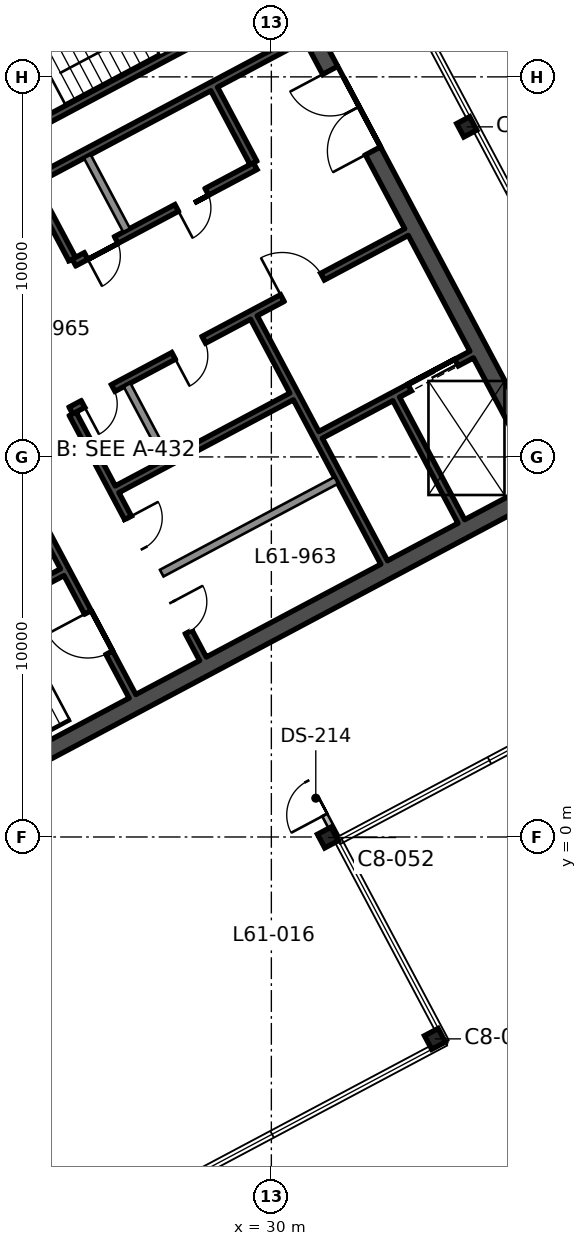
"""IFC4 building model, lengths in metres.
Left out: names, types, materials, properties, quantities, classifications, styles, units other than length and angle.
Written with IfcOpenShell. Run it as: python <this file> out.ifc"""

import sys

from ifc_helpers import new_model, si_unit, direction, frame, frame_2d, origin, origin_2d, place, context, subcontext, project, spatial, rectangle, i_section, extrude, element, fill, save


model = new_model("IFC4")
c1 = context("Model", 3, precision=1e-05, world=origin(), true_north=direction((0.0, 1.0)))
c2 = subcontext(c1, "Body", "Model", "MODEL_VIEW")
j1 = project(units=[si_unit("LENGTHUNIT", "METRE"), si_unit("PLANEANGLEUNIT", "RADIAN")], contexts=[c1])
p1 = place(None, origin())
s1 = spatial("IfcSite", under=j1, at=p1, CompositionType="ELEMENT")
p2 = place(p1, origin())
s2 = spatial("IfcBuilding", under=s1, at=p2, CompositionType="ELEMENT")
p3 = place(p2, frame((0.0, 0.0, 273.6)))
s3 = spatial("IfcBuildingStorey", under=s2, at=p3, CompositionType="ELEMENT", Elevation=273.6)
for number, where, z_axis, x_axis in (
    (1, (34.304, -5.312, 0.0), (0.0, 0.0, 1.0), (-0.469, 0.883, 0.0)),
    (2, (31.487, -0.014, 0.0), (0.0, 0.0, 1.0), (0.883, 0.469, 0.0)),
):
    element("IfcColumn", number, at=place(p3, frame(where, z_axis=z_axis, x_axis=x_axis)), inside=s3, PredefinedType="COLUMN", context=c2, shape_type="SweptSolid", body=[
        extrude(i_section(OverallWidth=0.404, OverallDepth=0.406, WebThickness=0.027, FlangeThickness=0.044, FilletRadius=0.015, at=origin_2d()), origin(), (0.0, 0.0, 1.0), 3.9),
    ])
p4 = place(p3, frame((35.141, 18.685, 0.0), z_axis=(0.0, 0.0, 1.0), x_axis=(-0.469471562786, 0.882947592859, 0.0)))
e3 = element("IfcColumn", 3, at=p4, inside=s3, PredefinedType="COLUMN", context=c2, shape_type="SweptSolid", body=[
    extrude(i_section(OverallWidth=0.399, OverallDepth=0.386, WebThickness=0.021, FlangeThickness=0.033, FilletRadius=0.015, at=origin_2d()), origin(), (0.0, 0.0, 1.0), 3.9),
])
p5 = place(p3, frame((37.439, 9.091, 0.0), z_axis=(0.0, 0.0, 1.0), x_axis=(-0.469467968382, 0.882949504028, 0.0)))
e4 = element("IfcWall", 4, at=p5, inside=s3, PredefinedType="SHEAR", context=c2, shape_type="SweptSolid", body=[
    extrude(rectangle(XDim=19.1, YDim=0.45, at=frame_2d((9.55, 0.0))), origin(), (0.0, 0.0, 1.0), 3.9),
])
p6 = place(p5, frame((10.15, 0.0, 0.0)))
e5 = element("IfcOpeningElement", 5, at=p6, cuts=e4, PredefinedType="OPENING", context=c2, shape_type="SweptSolid", body=[
    extrude(rectangle(XDim=2.4, YDim=2.4, at=frame_2d((1.2, 1.2))), frame((0.0, 0.235, 0.0), z_axis=(0.0, -1.0, 0.0), x_axis=(1.0, 0.0, 0.0)), (0.0, 0.0, 1.0), 0.47),
])
p7 = place(p3, frame((19.3, -0.299, 0.0), z_axis=(0.0, 0.0, 1.0), x_axis=(0.88295276571, 0.46946183394, 0.0)))
e6 = element("IfcWall", 6, at=p7, inside=s3, PredefinedType="SHEAR", context=c2, shape_type="SweptSolid", body=[
    extrude(rectangle(XDim=20.2, YDim=0.45, at=frame_2d((10.1, 0.0))), origin(), (0.0, 0.0, 1.0), 3.9),
])
p8 = place(p3, frame((10.544, 16.167, 0.0), z_axis=(0.0, 0.0, 1.0), x_axis=(0.882947755831, 0.46947125628, 0.0)))
e7 = element("IfcWall", 7, at=p8, inside=s3, PredefinedType="SHEAR", context=c2, shape_type="SweptSolid", body=[
    extrude(rectangle(XDim=20.2, YDim=0.45, at=frame_2d((10.1, 0.0))), origin(), (0.0, 0.0, 1.0), 3.9),
])
p9 = place(p3, frame((26.346, 3.702, 0.0), z_axis=(0.0, 0.0, 1.0), x_axis=(-0.469480409012, 0.88294288918, 0.0)))
e8 = element("IfcWall", 8, at=p9, inside=s3, PredefinedType="SHEAR", context=c2, shape_type="SweptSolid", body=[
    extrude(rectangle(XDim=7.3, YDim=0.2, at=frame_2d((3.65, 0.0))), origin(), (0.0, 0.0, 1.0), 3.9),
])
p10 = place(p9, frame((1.3, 0.0, 0.0)))
e9 = element("IfcOpeningElement", 9, at=p10, cuts=e8, PredefinedType="OPENING", context=c2, shape_type="SweptSolid", body=[
    extrude(rectangle(XDim=1.2, YDim=2.1, at=frame_2d((0.6, 1.05))), frame((0.0, 0.11, 0.0), z_axis=(0.0, -1.0, 0.0), x_axis=(1.0, 0.0, 0.0)), (0.0, 0.0, 1.0), 0.22),
])
p11 = place(p3, frame((28.2, 4.688, 0.0), z_axis=(0.0, 0.0, 1.0), x_axis=(-0.469454336211, 0.882956752176, 0.0)))
e10 = element("IfcWall", 10, at=p11, inside=s3, PredefinedType="SHEAR", context=c2, shape_type="SweptSolid", body=[
    extrude(rectangle(XDim=7.3, YDim=0.2, at=frame_2d((3.65, 0.0))), origin(), (0.0, 0.0, 1.0), 3.9),
])
p12 = place(p11, frame((0.8, 0.0, 0.0)))
e11 = element("IfcOpeningElement", 11, at=p12, cuts=e10, PredefinedType="OPENING", context=c2, shape_type="SweptSolid", body=[
    extrude(rectangle(XDim=0.9, YDim=2.1, at=frame_2d((0.45, 1.05))), frame((0.0, 0.11, 0.0), z_axis=(0.0, -1.0, 0.0), x_axis=(1.0, 0.0, 0.0)), (0.0, 0.0, 1.0), 0.22),
])
p13 = place(p11, frame((3.3, 0.0, 0.0)))
e12 = element("IfcOpeningElement", 12, at=p13, cuts=e10, PredefinedType="OPENING", context=c2, shape_type="SweptSolid", body=[
    extrude(rectangle(XDim=0.9, YDim=2.1, at=frame_2d((0.45, 1.05))), frame((0.0, 0.11, 0.0), z_axis=(0.0, -1.0, 0.0), x_axis=(1.0, 0.0, 0.0)), (0.0, 0.0, 1.0), 0.22),
])
p14 = place(p3, frame((27.236, 9.951, 0.0), z_axis=(0.0, 0.0, 1.0), x_axis=(-0.4694473164, 0.882960484464, 0.0)))
e13 = element("IfcWall", 13, at=p14, inside=s3, PredefinedType="SOLIDWALL", context=c2, shape_type="SweptSolid", body=[
    extrude(rectangle(XDim=2.2, YDim=0.2, at=frame_2d((1.1, 0.0))), origin(), (0.0, 0.0, 1.0), 3.9),
])
p15 = place(p3, frame((24.76, 15.204, 0.0), z_axis=(0.0, 0.0, 1.0), x_axis=(-0.469494272526, 0.882935517501, 0.0)))
e14 = element("IfcWall", 14, at=p15, inside=s3, PredefinedType="SHEAR", context=c2, shape_type="SweptSolid", body=[
    extrude(rectangle(XDim=7.3, YDim=0.2, at=frame_2d((3.65, 0.0))), origin(), (0.0, 0.0, 1.0), 3.9),
])
p16 = place(p15, frame((4.8, 0.0, 0.0)))
e15 = element("IfcOpeningElement", 15, at=p16, cuts=e14, PredefinedType="OPENING", context=c2, shape_type="SweptSolid", body=[
    extrude(rectangle(XDim=1.2, YDim=2.1, at=frame_2d((0.6, 1.05))), frame((0.0, 0.11, 0.0), z_axis=(0.0, -1.0, 0.0), x_axis=(1.0, 0.0, 0.0)), (0.0, 0.0, 1.0), 0.22),
])
p17 = place(p3, frame((26.191, 15.965, 0.0), z_axis=(0.0, 0.0, 1.0), x_axis=(-0.469533832133, 0.882914480843, 0.0)))
e16 = element("IfcWall", 16, at=p17, inside=s3, PredefinedType="SOLIDWALL", context=c2, shape_type="SweptSolid", body=[
    extrude(rectangle(XDim=2.2, YDim=0.2, at=frame_2d((1.1, 0.0))), origin(), (0.0, 0.0, 1.0), 3.9),
])
p18 = place(p3, frame((32.968, 7.223, 0.0), z_axis=(0.0, 0.0, 1.0), x_axis=(-0.469480409012, 0.88294288918, 0.0)))
e17 = element("IfcWall", 17, at=p18, inside=s3, PredefinedType="SHEAR", context=c2, shape_type="SweptSolid", body=[
    extrude(rectangle(XDim=7.3, YDim=0.2, at=frame_2d((3.65, 0.0))), origin(), (0.0, 0.0, 1.0), 3.9),
])
p19 = place(p3, frame((29.528, 17.739, 0.0), z_axis=(0.0, 0.0, 1.0), x_axis=(-0.469401318492, 0.882984938828, 0.0)))
e18 = element("IfcWall", 18, at=p19, inside=s3, PredefinedType="SHEAR", context=c2, shape_type="SweptSolid", body=[
    extrude(rectangle(XDim=2.2, YDim=0.2, at=frame_2d((1.1, 0.0))), origin(), (0.0, 0.0, 1.0), 3.9),
])
p20 = place(p3, frame((34.999, 8.303, 0.0), z_axis=(0.0, 0.0, 1.0), x_axis=(-0.4694665462, 0.882950260207, 0.0)))
e19 = element("IfcWall", 19, at=p20, inside=s3, PredefinedType="SHEAR", context=c2, shape_type="SweptSolid", body=[
    extrude(rectangle(XDim=3.65, YDim=0.2, at=frame_2d((1.825, 0.0))), origin(), (0.0, 0.0, 1.0), 3.9),
])
p21 = place(p3, frame((27.115, 6.942, 0.0), z_axis=(0.0, 0.0, 1.0), x_axis=(0.882934506056, 0.469496174655, 0.0)))
e20 = element("IfcWall", 20, at=p21, inside=s3, PredefinedType="SOLIDWALL", context=c2, shape_type="SweptSolid", body=[
    extrude(rectangle(XDim=5.2, YDim=0.2, at=frame_2d((2.6, 0.0))), origin(), (0.0, 0.0, 1.0), 3.9),
])
p22 = place(p3, frame((17.434, 3.21, 0.0), z_axis=(0.0, 0.0, 1.0), x_axis=(0.882940221191, 0.469485426614, 0.0)))
e21 = element("IfcWall", 21, at=p22, inside=s3, PredefinedType="SHEAR", context=c2, shape_type="SweptSolid", body=[
    extrude(rectangle(XDim=8.0, YDim=0.2, at=frame_2d((4.0, 0.0))), origin(), (0.0, 0.0, 1.0), 3.9),
])
p23 = place(p3, frame((31.296, 10.581, 0.0), z_axis=(0.0, 0.0, 1.0), x_axis=(0.882960433586, 0.469447412093, 0.0)))
e22 = element("IfcWall", 22, at=p23, inside=s3, PredefinedType="SHEAR", context=c2, shape_type="SweptSolid", body=[
    extrude(rectangle(XDim=4.5, YDim=0.2, at=frame_2d((2.25, 0.0))), origin(), (0.0, 0.0, 1.0), 3.9),
])
p24 = place(p23, frame((2.65, 0.0, 0.0)))
e23 = element("IfcOpeningElement", 23, at=p24, cuts=e22, PredefinedType="OPENING", context=c2, shape_type="SweptSolid", body=[
    extrude(rectangle(XDim=1.4, YDim=2.4, at=frame_2d((0.7, 1.2))), frame((0.0, 0.11, 0.0), z_axis=(0.0, -1.0, 0.0), x_axis=(1.0, 0.0, 0.0)), (0.0, 0.0, 1.0), 0.22),
])
p25 = place(p3, frame((25.941, 9.15, 0.0), z_axis=(0.0, 0.0, 1.0), x_axis=(0.882953967957, 0.469459572775, 0.0)))
e24 = element("IfcWall", 24, at=p25, inside=s3, PredefinedType="SHEAR", context=c2, shape_type="SweptSolid", body=[
    extrude(rectangle(XDim=5.2, YDim=0.2, at=frame_2d((2.6, 0.0))), origin(), (0.0, 0.0, 1.0), 3.9),
])
p26 = place(p3, frame((24.726, 11.222, 0.0), z_axis=(0.0, 0.0, 1.0), x_axis=(0.882940221191, 0.469485426614, 0.0)))
e25 = element("IfcWall", 25, at=p26, inside=s3, PredefinedType="SHEAR", context=c2, shape_type="SweptSolid", body=[
    extrude(rectangle(XDim=10.0, YDim=0.2, at=frame_2d((5.0, 0.0))), origin(), (0.0, 0.0, 1.0), 3.9),
])
p27 = place(p26, frame((6.3, 0.0, 0.0)))
e26 = element("IfcOpeningElement", 26, at=p27, cuts=e25, PredefinedType="OPENING", context=c2, shape_type="SweptSolid", body=[
    extrude(rectangle(XDim=1.2, YDim=2.1, at=frame_2d((0.6, 1.05))), frame((0.0, 0.11, 0.0), z_axis=(0.0, -1.0, 0.0), x_axis=(1.0, 0.0, 0.0)), (0.0, 0.0, 1.0), 0.22),
])
p28 = place(p26, frame((0.36, 0.0, 0.0)))
e27 = element("IfcOpeningElement", 27, at=p28, cuts=e25, PredefinedType="OPENING", context=c2, shape_type="SweptSolid", body=[
    extrude(rectangle(XDim=0.9, YDim=2.1, at=frame_2d((0.45, 1.05))), frame((0.0, 0.11, 0.0), z_axis=(0.0, -1.0, 0.0), x_axis=(1.0, 0.0, 0.0)), (0.0, 0.0, 1.0), 0.22),
])
p29 = place(p26, frame((3.06, 0.0, 0.0)))
e28 = element("IfcOpeningElement", 28, at=p29, cuts=e25, PredefinedType="OPENING", context=c2, shape_type="SweptSolid", body=[
    extrude(rectangle(XDim=0.9, YDim=2.1, at=frame_2d((0.45, 1.05))), frame((0.0, 0.11, 0.0), z_axis=(0.0, -1.0, 0.0), x_axis=(1.0, 0.0, 0.0)), (0.0, 0.0, 1.0), 0.22),
])
p30 = place(p3, frame((24.807, 15.116, 0.0), z_axis=(0.0, 0.0, 1.0), x_axis=(0.882942972946, 0.469480251476, 0.0)))
e29 = element("IfcWall", 29, at=p30, inside=s3, PredefinedType="SHEAR", context=c2, shape_type="SweptSolid", body=[
    extrude(rectangle(XDim=5.4, YDim=0.2, at=frame_2d((2.7, 0.0))), origin(), (0.0, 0.0, 1.0), 3.9),
])
p31 = place(p30, frame((0.36, 0.0, 0.0)))
e30 = element("IfcOpeningElement", 30, at=p31, cuts=e29, PredefinedType="OPENING", context=c2, shape_type="SweptSolid", body=[
    extrude(rectangle(XDim=0.9, YDim=2.1, at=frame_2d((0.45, 1.05))), frame((0.0, 0.11, 0.0), z_axis=(0.0, -1.0, 0.0), x_axis=(1.0, 0.0, 0.0)), (0.0, 0.0, 1.0), 0.22),
])
p32 = place(p30, frame((3.06, 0.0, 0.0)))
e31 = element("IfcOpeningElement", 31, at=p32, cuts=e29, PredefinedType="OPENING", context=c2, shape_type="SweptSolid", body=[
    extrude(rectangle(XDim=0.9, YDim=2.1, at=frame_2d((0.45, 1.05))), frame((0.0, 0.11, 0.0), z_axis=(0.0, -1.0, 0.0), x_axis=(1.0, 0.0, 0.0)), (0.0, 0.0, 1.0), 0.22),
])
p33 = place(p3, frame((23.769, 17.282, 0.0), z_axis=(0.0, 0.0, 1.0), x_axis=(0.882940221191, 0.469485426614, 0.0)))
e32 = element("IfcWall", 32, at=p33, inside=s3, PredefinedType="SHEAR", context=c2, shape_type="SweptSolid", body=[
    extrude(rectangle(XDim=8.0, YDim=0.2, at=frame_2d((4.0, 0.0))), origin(), (0.0, 0.0, 1.0), 3.9),
])
p34 = place(p3, frame((23.182, 18.385, 0.0), z_axis=(0.0, 0.0, 1.0), x_axis=(0.88295287151, 0.469461634952, 0.0)))
e33 = element("IfcWall", 33, at=p34, inside=s3, PredefinedType="SHEAR", context=c2, shape_type="SweptSolid", body=[
    extrude(rectangle(XDim=8.0, YDim=0.2, at=frame_2d((4.0, 0.0))), origin(), (0.0, 0.0, 1.0), 3.9),
])
p35 = place(p3, frame((0.0, 13.817, 0.0), z_axis=(0.0, 0.0, 1.0), x_axis=(0.882939200239, 0.469487346668, 0.0)))
e34 = element("IfcWall", 34, at=p35, inside=s3, PredefinedType="PARTITIONING", context=c2, shape_type="SweptSolid", body=[
    extrude(rectangle(XDim=33.714, YDim=0.15, at=frame_2d((16.857, 0.0))), origin(), (0.0, 0.0, 1.0), 3.54),
])
p36 = place(p35, frame((15.95, 0.0, 0.0)))
e35 = element("IfcOpeningElement", 35, at=p36, cuts=e34, PredefinedType="OPENING", context=c2, shape_type="SweptSolid", body=[
    extrude(rectangle(XDim=1.8, YDim=2.1, at=frame_2d((0.9, 1.05))), frame((0.0, 0.085, 0.0), z_axis=(0.0, -1.0, 0.0), x_axis=(1.0, 0.0, 0.0)), (0.0, 0.0, 1.0), 0.17),
])
p37 = place(p3, frame((25.889, -0.052, 0.0), z_axis=(0.0, 0.0, 1.0), x_axis=(0.469351570135, -0.883011383625, 0.0)))
e36 = element("IfcWall", 36, at=p37, inside=s3, PredefinedType="PARTITIONING", context=c2, shape_type="SweptSolid", body=[
    extrude(rectangle(XDim=9.0, YDim=0.15, at=frame_2d((4.5, 0.0))), origin(), (0.0, 0.0, 1.0), 3.54),
])
p38 = place(p3, frame((31.897, -0.347, 0.0), z_axis=(0.0, 0.0, 1.0), x_axis=(-0.469670796129, 0.882841629775, 0.0)))
e37 = element("IfcWall", 37, at=p38, inside=s3, PredefinedType="PARTITIONING", context=c2, shape_type="SweptSolid", body=[
    extrude(rectangle(XDim=3.081, YDim=0.15, at=frame_2d((1.541, 0.0))), origin(), (0.0, 0.0, 1.0), 3.54),
])
p39 = place(p38, frame((1.05, 0.0, 0.0)))
e38 = element("IfcOpeningElement", 38, at=p39, cuts=e37, PredefinedType="OPENING", context=c2, shape_type="SweptSolid", body=[
    extrude(rectangle(XDim=1.0, YDim=2.1, at=frame_2d((0.5, 1.05))), frame((0.0, 0.085, 0.0), z_axis=(0.0, -1.0, 0.0), x_axis=(1.0, 0.0, 0.0)), (0.0, 0.0, 1.0), 0.17),
])
p40 = place(p3, frame((30.45, 2.373, 0.0), z_axis=(0.0, 0.0, 1.0), x_axis=(-0.882945015872, -0.46947640936, 0.0)))
e39 = element("IfcWall", 39, at=p40, inside=s3, PredefinedType="PARTITIONING", context=c2, shape_type="SweptSolid", body=[
    extrude(rectangle(XDim=18.857, YDim=0.15, at=frame_2d((9.429, 0.0))), origin(), (0.0, 0.0, 1.0), 3.54),
])
p41 = place(p6, origin())
e40 = element("IfcDoor", 40, at=p41, inside=s3, OperationType="DOUBLE_DOOR_SINGLE_SWING", PredefinedType="DOOR", context=c2, shape_type="SweptSolid", body=[
    extrude(rectangle(XDim=2.4, YDim=2.4, at=frame_2d((1.2, 1.2))), frame((0.0, 0.025, 0.0), z_axis=(0.0, -1.0, 0.0), x_axis=(1.0, 0.0, 0.0)), (0.0, 0.0, 1.0), 0.05),
])
fill(e5, e40)
p42 = place(p27, origin())
e41 = element("IfcDoor", 41, at=p42, inside=s3, OperationType="SINGLE_SWING_LEFT", PredefinedType="DOOR", context=c2, shape_type="SweptSolid", body=[
    extrude(rectangle(XDim=1.2, YDim=2.1, at=frame_2d((0.6, 1.05))), frame((0.0, 0.025, 0.0), z_axis=(0.0, -1.0, 0.0), x_axis=(1.0, 0.0, 0.0)), (0.0, 0.0, 1.0), 0.05),
])
fill(e26, e41)
p43 = place(p10, origin())
e42 = element("IfcDoor", 42, at=p43, inside=s3, OperationType="SINGLE_SWING_RIGHT", PredefinedType="DOOR", context=c2, shape_type="SweptSolid", body=[
    extrude(rectangle(XDim=1.2, YDim=2.1, at=frame_2d((0.6, 1.05))), frame((0.0, 0.025, 0.0), z_axis=(0.0, -1.0, 0.0), x_axis=(1.0, 0.0, 0.0)), (0.0, 0.0, 1.0), 0.05),
])
fill(e9, e42)
p44 = place(p31, frame((0.9, 0.0, 0.0), z_axis=(0.0, 0.0, 1.0), x_axis=(-1.0, 0.0, 0.0)))
e43 = element("IfcDoor", 43, at=p44, inside=s3, OperationType="SINGLE_SWING_RIGHT", PredefinedType="DOOR", context=c2, shape_type="SweptSolid", body=[
    extrude(rectangle(XDim=0.9, YDim=2.1, at=frame_2d((0.45, 1.05))), frame((0.0, 0.025, 0.0), z_axis=(0.0, -1.0, 0.0), x_axis=(1.0, 0.0, 0.0)), (0.0, 0.0, 1.0), 0.05),
])
fill(e30, e43)
p45 = place(p32, frame((0.9, 0.0, 0.0), z_axis=(0.0, 0.0, 1.0), x_axis=(-1.0, 0.0, 0.0)))
e44 = element("IfcDoor", 44, at=p45, inside=s3, OperationType="SINGLE_SWING_RIGHT", PredefinedType="DOOR", context=c2, shape_type="SweptSolid", body=[
    extrude(rectangle(XDim=0.9, YDim=2.1, at=frame_2d((0.45, 1.05))), frame((0.0, 0.025, 0.0), z_axis=(0.0, -1.0, 0.0), x_axis=(1.0, 0.0, 0.0)), (0.0, 0.0, 1.0), 0.05),
])
fill(e31, e44)
p46 = place(p28, frame((0.9, 0.0, 0.0), z_axis=(0.0, 0.0, 1.0), x_axis=(-1.0, 0.0, 0.0)))
e45 = element("IfcDoor", 45, at=p46, inside=s3, OperationType="SINGLE_SWING_RIGHT", PredefinedType="DOOR", context=c2, shape_type="SweptSolid", body=[
    extrude(rectangle(XDim=0.9, YDim=2.1, at=frame_2d((0.45, 1.05))), frame((0.0, 0.025, 0.0), z_axis=(0.0, -1.0, 0.0), x_axis=(1.0, 0.0, 0.0)), (0.0, 0.0, 1.0), 0.05),
])
fill(e27, e45)
p47 = place(p29, frame((0.9, 0.0, 0.0), z_axis=(0.0, 0.0, 1.0), x_axis=(-1.0, 0.0, 0.0)))
e46 = element("IfcDoor", 46, at=p47, inside=s3, OperationType="SINGLE_SWING_RIGHT", PredefinedType="DOOR", context=c2, shape_type="SweptSolid", body=[
    extrude(rectangle(XDim=0.9, YDim=2.1, at=frame_2d((0.45, 1.05))), frame((0.0, 0.025, 0.0), z_axis=(0.0, -1.0, 0.0), x_axis=(1.0, 0.0, 0.0)), (0.0, 0.0, 1.0), 0.05),
])
fill(e28, e46)
p48 = place(p24, origin())
e47 = element("IfcDoor", 47, at=p48, inside=s3, OperationType="DOUBLE_DOOR_SLIDING", PredefinedType="DOOR", context=c2, shape_type="SweptSolid", body=[
    extrude(rectangle(XDim=1.4, YDim=2.4, at=frame_2d((0.7, 1.2))), frame((0.0, 0.025, 0.0), z_axis=(0.0, -1.0, 0.0), x_axis=(1.0, 0.0, 0.0)), (0.0, 0.0, 1.0), 0.05),
])
fill(e23, e47)
p49 = place(p12, frame((0.9, 0.0, 0.0), z_axis=(0.0, 0.0, 1.0), x_axis=(-1.0, 0.0, 0.0)))
e48 = element("IfcDoor", 48, at=p49, inside=s3, OperationType="SINGLE_SWING_LEFT", PredefinedType="DOOR", context=c2, shape_type="SweptSolid", body=[
    extrude(rectangle(XDim=0.9, YDim=2.1, at=frame_2d((0.45, 1.05))), frame((0.0, 0.025, 0.0), z_axis=(0.0, -1.0, 0.0), x_axis=(1.0, 0.0, 0.0)), (0.0, 0.0, 1.0), 0.05),
])
fill(e11, e48)
p50 = place(p13, frame((0.9, 0.0, 0.0), z_axis=(0.0, 0.0, 1.0), x_axis=(-1.0, 0.0, 0.0)))
e49 = element("IfcDoor", 49, at=p50, inside=s3, OperationType="SINGLE_SWING_LEFT", PredefinedType="DOOR", context=c2, shape_type="SweptSolid", body=[
    extrude(rectangle(XDim=0.9, YDim=2.1, at=frame_2d((0.45, 1.05))), frame((0.0, 0.025, 0.0), z_axis=(0.0, -1.0, 0.0), x_axis=(1.0, 0.0, 0.0)), (0.0, 0.0, 1.0), 0.05),
])
fill(e12, e49)
p51 = place(p39, origin())
e50 = element("IfcDoor", 50, at=p51, inside=s3, OperationType="SINGLE_SWING_LEFT", PredefinedType="DOOR", context=c2, shape_type="SweptSolid", body=[
    extrude(rectangle(XDim=1.0, YDim=2.1, at=frame_2d((0.5, 1.05))), frame((0.0, 0.025, 0.0), z_axis=(0.0, -1.0, 0.0), x_axis=(1.0, 0.0, 0.0)), (0.0, 0.0, 1.0), 0.05),
])
fill(e38, e50)
save(model, sys.argv[1])
